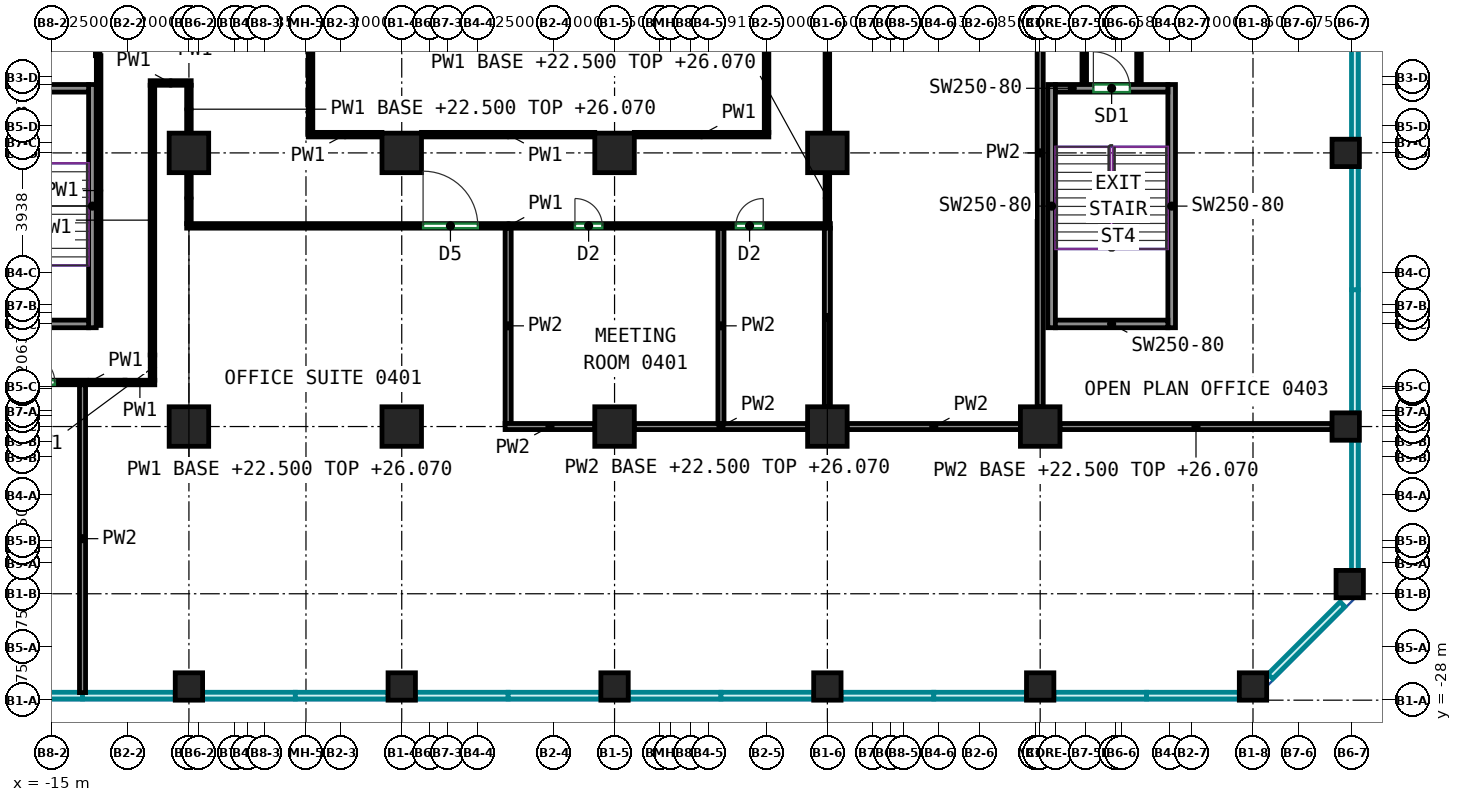
"""IFC4 building model, lengths in metres.
Left out: names, types, materials, properties, quantities, classifications, styles, units other than length and angle.
Written with IfcOpenShell. Run it as: python <this file> out.ifc"""

import sys

from ifc_helpers import new_model, si_unit, direction, frame, frame_2d, origin, origin_2d, place, context, subcontext, project, spatial, rectangle, extrude, source, transform, mapped, element, fill, save


model = new_model("IFC4")
c1 = context("Model", 3, precision=1e-05, world=origin(), true_north=direction((0.0, 1.0)))
c2 = subcontext(c1, "Body", "Model", "MODEL_VIEW")
j1 = project(units=[si_unit("LENGTHUNIT", "METRE"), si_unit("PLANEANGLEUNIT", "RADIAN")], contexts=[c1])
p1 = place(None, origin())
s1 = spatial("IfcSite", under=j1, at=p1, CompositionType="ELEMENT")
p2 = place(p1, origin())
s2 = spatial("IfcBuilding", under=s1, at=p2, CompositionType="ELEMENT")
p3 = place(p2, frame((0.0, 0.0, 22.5)))
s3 = spatial("IfcBuildingStorey", under=s2, at=p3, CompositionType="ELEMENT", Elevation=22.5)
m1 = source(origin(), c2, "Body", "SweptSolid", [
    extrude(rectangle(XDim=0.9, YDim=0.9, at=origin_2d()), origin(), (0.0, 0.0, 1.0), 4.22),
])
p4 = place(p3, frame((-10.5, -27.55, 0.0), z_axis=(0.0, 0.0, 1.0), x_axis=(1.0, 0.0, 0.0)))
e1 = element("IfcColumn", 1, at=p4, inside=s3, PredefinedType="COLUMN", context=c2, shape_type="MappedRepresentation", body=[
    mapped(m1, transform((0.0, 0.0, 0.0))),
])
m2 = source(origin(), c2, "Body", "SweptSolid", [
    extrude(rectangle(XDim=1.3, YDim=1.3, at=origin_2d()), origin(), (0.0, 0.0, 1.0), 4.22),
])
for number, where, z_axis, x_axis in (
    (2, (-10.5, -19.0, 0.0), (0.0, 0.0, 1.0), (1.0, 0.0, 0.0)),
    (3, (-10.5, -10.0, 0.0), (0.0, 0.0, 1.0), (1.0, 0.0, 0.0)),
):
    element("IfcColumn", number, at=place(p3, frame(where, z_axis=z_axis, x_axis=x_axis)), inside=s3, PredefinedType="COLUMN", context=c2, shape_type="MappedRepresentation", body=[
        mapped(m2, transform((0.0, 0.0, 0.0))),
    ])
p5 = place(p3, frame((-3.5, -27.55, 0.0), z_axis=(0.0, 0.0, 1.0), x_axis=(1.0, 0.0, 0.0)))
e4 = element("IfcColumn", 4, at=p5, inside=s3, PredefinedType="COLUMN", context=c2, shape_type="MappedRepresentation", body=[
    mapped(m1, transform((0.0, 0.0, 0.0))),
])
for number, where, z_axis, x_axis in (
    (5, (-3.5, -19.0, 0.0), (0.0, 0.0, 1.0), (1.0, 0.0, 0.0)),
    (6, (-3.5, -10.0, 0.0), (0.0, 0.0, 1.0), (1.0, 0.0, 0.0)),
):
    element("IfcColumn", number, at=place(p3, frame(where, z_axis=z_axis, x_axis=x_axis)), inside=s3, PredefinedType="COLUMN", context=c2, shape_type="MappedRepresentation", body=[
        mapped(m2, transform((0.0, 0.0, 0.0))),
    ])
p6 = place(p3, frame((3.5, -27.55, 0.0), z_axis=(0.0, 0.0, 1.0), x_axis=(1.0, 0.0, 0.0)))
e7 = element("IfcColumn", 7, at=p6, inside=s3, PredefinedType="COLUMN", context=c2, shape_type="MappedRepresentation", body=[
    mapped(m1, transform((0.0, 0.0, 0.0))),
])
for number, where, z_axis, x_axis in (
    (8, (3.5, -19.0, 0.0), (0.0, 0.0, 1.0), (1.0, 0.0, 0.0)),
    (9, (3.5, -10.0, 0.0), (0.0, 0.0, 1.0), (1.0, 0.0, 0.0)),
):
    element("IfcColumn", number, at=place(p3, frame(where, z_axis=z_axis, x_axis=x_axis)), inside=s3, PredefinedType="COLUMN", context=c2, shape_type="MappedRepresentation", body=[
        mapped(m2, transform((0.0, 0.0, 0.0))),
    ])
p7 = place(p3, frame((10.5, -27.55, 0.0), z_axis=(0.0, 0.0, 1.0), x_axis=(1.0, 0.0, 0.0)))
e10 = element("IfcColumn", 10, at=p7, inside=s3, PredefinedType="COLUMN", context=c2, shape_type="MappedRepresentation", body=[
    mapped(m1, transform((0.0, 0.0, 0.0))),
])
for number, where, z_axis, x_axis in (
    (11, (10.5, -19.0, 0.0), (0.0, 0.0, 1.0), (1.0, 0.0, 0.0)),
    (12, (10.5, -10.0, 0.0), (0.0, 0.0, 1.0), (1.0, 0.0, 0.0)),
):
    element("IfcColumn", number, at=place(p3, frame(where, z_axis=z_axis, x_axis=x_axis)), inside=s3, PredefinedType="COLUMN", context=c2, shape_type="MappedRepresentation", body=[
        mapped(m2, transform((0.0, 0.0, 0.0))),
    ])
p8 = place(p3, frame((17.5, -27.55, 0.0), z_axis=(0.0, 0.0, 1.0), x_axis=(1.0, 0.0, 0.0)))
e13 = element("IfcColumn", 13, at=p8, inside=s3, PredefinedType="COLUMN", context=c2, shape_type="MappedRepresentation", body=[
    mapped(m1, transform((0.0, 0.0, 0.0))),
])
p9 = place(p3, frame((17.5, -19.0, 0.0), z_axis=(0.0, 0.0, 1.0), x_axis=(1.0, 0.0, 0.0)))
e14 = element("IfcColumn", 14, at=p9, inside=s3, PredefinedType="COLUMN", context=c2, shape_type="MappedRepresentation", body=[
    mapped(m2, transform((0.0, 0.0, 0.0))),
])
for number, where, z_axis, x_axis in (
    (15, (24.5, -27.55, 0.0), (0.0, 0.0, 1.0), (1.0, 0.0, 0.0)),
    (16, (27.55, -19.0, 0.0), (0.0, 0.0, 1.0), (1.0, 0.0, 0.0)),
    (17, (27.55, -10.0, 0.0), (0.0, 0.0, 1.0), (1.0, 0.0, 0.0)),
    (18, (27.682, -24.182, 0.0), (0.0, 0.0, 1.0), (1.0, 0.0, 0.0)),
):
    element("IfcColumn", number, at=place(p3, frame(where, z_axis=z_axis, x_axis=x_axis)), inside=s3, PredefinedType="COLUMN", context=c2, shape_type="MappedRepresentation", body=[
        mapped(m1, transform((0.0, 0.0, 0.0))),
    ])
m3 = source(origin(), c2, "Body", "SweptSolid", [
    extrude(rectangle(XDim=8.0, YDim=0.25, at=frame_2d((4.0, 0.0))), origin(), (0.0, 0.0, 1.0), 4.22),
])
p10 = place(p3, frame((-13.675, -15.75, 0.0), z_axis=(0.0, 0.0, 1.0), x_axis=(0.0, 1.0, 0.0)))
e19 = element("IfcWall", 19, at=p10, inside=s3, PredefinedType="SHEAR", context=c2, shape_type="MappedRepresentation", body=[
    mapped(m3, transform((0.0, 0.0, 0.0))),
])
m4 = source(origin(), c2, "Body", "SweptSolid", [
    extrude(rectangle(XDim=3.7, YDim=0.25, at=frame_2d((1.85, 0.0))), origin(), (0.0, 0.0, 1.0), 4.22),
])
p11 = place(p3, frame((-17.5, -15.625, 0.0), z_axis=(0.0, 0.0, 1.0), x_axis=(1.0, 0.0, 0.0)))
e20 = element("IfcWall", 20, at=p11, inside=s3, PredefinedType="SHEAR", context=c2, shape_type="MappedRepresentation", body=[
    mapped(m4, transform((0.0, 0.0, 0.0))),
])
p12 = place(p11, frame((1.25, 0.0, 0.0)))
e21 = element("IfcOpeningElement", 21, at=p12, cuts=e20, PredefinedType="OPENING", context=c2, shape_type="SweptSolid", body=[
    extrude(rectangle(XDim=1.2, YDim=2.1, at=frame_2d((0.6, 1.05))), frame((0.0, 0.135, 0.0), z_axis=(0.0, -1.0, 0.0), x_axis=(1.0, 0.0, 0.0)), (0.0, 0.0, 1.0), 0.27),
])
p13 = place(p3, frame((-17.5, -7.875, 0.0), z_axis=(0.0, 0.0, 1.0), x_axis=(1.0, 0.0, 0.0)))
e22 = element("IfcWall", 22, at=p13, inside=s3, PredefinedType="SHEAR", context=c2, shape_type="MappedRepresentation", body=[
    mapped(m4, transform((0.0, 0.0, 0.0))),
])
for number, where, z_axis, x_axis in (
    (23, (17.875, -15.75, 0.0), (0.0, 0.0, 1.0), (0.0, 1.0, 0.0)),
    (24, (21.825, -15.75, 0.0), (0.0, 0.0, 1.0), (0.0, 1.0, 0.0)),
):
    element("IfcWall", number, at=place(p3, frame(where, z_axis=z_axis, x_axis=x_axis)), inside=s3, PredefinedType="SHEAR", context=c2, shape_type="MappedRepresentation", body=[
        mapped(m3, transform((0.0, 0.0, 0.0))),
    ])
p14 = place(p3, frame((18.0, -15.625, 0.0), z_axis=(0.0, 0.0, 1.0), x_axis=(1.0, 0.0, 0.0)))
e25 = element("IfcWall", 25, at=p14, inside=s3, PredefinedType="SHEAR", context=c2, shape_type="MappedRepresentation", body=[
    mapped(m4, transform((0.0, 0.0, 0.0))),
])
p15 = place(p3, frame((18.0, -7.875, 0.0), z_axis=(0.0, 0.0, 1.0), x_axis=(1.0, 0.0, 0.0)))
e26 = element("IfcWall", 26, at=p15, inside=s3, PredefinedType="SHEAR", context=c2, shape_type="MappedRepresentation", body=[
    mapped(m4, transform((0.0, 0.0, 0.0))),
])
p16 = place(p15, frame((1.25, 0.0, 0.0)))
e27 = element("IfcOpeningElement", 27, at=p16, cuts=e26, PredefinedType="OPENING", context=c2, shape_type="SweptSolid", body=[
    extrude(rectangle(XDim=1.2, YDim=2.1, at=frame_2d((0.6, 1.05))), frame((0.0, 0.135, 0.0), z_axis=(0.0, -1.0, 0.0), x_axis=(1.0, 0.0, 0.0)), (0.0, 0.0, 1.0), 0.27),
])
p17 = place(p3, frame((-13.47, -6.802, 0.0), z_axis=(0.0, 0.0, 1.0), x_axis=(0.0, -1.0, 0.0)))
e28 = element("IfcWall", 28, at=p17, inside=s3, PredefinedType="PARTITIONING", context=c2, shape_type="SweptSolid", body=[
    extrude(rectangle(XDim=8.873, YDim=0.15, at=frame_2d((4.437, 0.0))), origin(), (0.0, 0.0, 1.0), 4.22),
])
p18 = place(p3, frame((-13.502, -5.973, 0.0), z_axis=(0.0, 0.0, 1.0), x_axis=(0.0, -1.0, 0.0)))
e29 = element("IfcWall", 29, at=p18, inside=s3, PredefinedType="PARTITIONING", context=c2, shape_type="SweptSolid", body=[
    extrude(rectangle(XDim=0.829, YDim=0.15, at=frame_2d((0.415, 0.0))), origin(), (0.0, 0.0, 1.0), 4.22),
])
p19 = place(p3, frame((-10.575, -12.4, 0.0), z_axis=(0.0, 0.0, 1.0), x_axis=(1.0, 0.0, 0.0)))
e30 = element("IfcWall", 30, at=p19, inside=s3, PredefinedType="PARTITIONING", context=c2, shape_type="SweptSolid", body=[
    extrude(rectangle(XDim=21.175, YDim=0.15, at=frame_2d((10.587, 0.0))), origin(), (0.0, 0.0, 1.0), 4.22),
])
p20 = place(p19, frame((7.777, 0.0, 0.0)))
e31 = element("IfcOpeningElement", 31, at=p20, cuts=e30, PredefinedType="OPENING", context=c2, shape_type="SweptSolid", body=[
    extrude(rectangle(XDim=1.8, YDim=2.1, at=frame_2d((0.9, 1.05))), frame((0.0, 0.085, 0.0), z_axis=(0.0, -1.0, 0.0), x_axis=(1.0, 0.0, 0.0)), (0.0, 0.0, 1.0), 0.17),
])
p21 = place(p19, frame((12.772, 0.0, 0.0)))
e32 = element("IfcOpeningElement", 32, at=p21, cuts=e30, PredefinedType="OPENING", context=c2, shape_type="SweptSolid", body=[
    extrude(rectangle(XDim=0.9, YDim=2.1, at=frame_2d((0.45, 1.05))), frame((0.0, 0.085, 0.0), z_axis=(0.0, -1.0, 0.0), x_axis=(1.0, 0.0, 0.0)), (0.0, 0.0, 1.0), 0.17),
])
p22 = place(p19, frame((18.066, 0.0, 0.0)))
e33 = element("IfcOpeningElement", 33, at=p22, cuts=e30, PredefinedType="OPENING", context=c2, shape_type="SweptSolid", body=[
    extrude(rectangle(XDim=0.9, YDim=2.1, at=frame_2d((0.45, 1.05))), frame((0.0, 0.085, 0.0), z_axis=(0.0, -1.0, 0.0), x_axis=(1.0, 0.0, 0.0)), (0.0, 0.0, 1.0), 0.17),
])
p23 = place(p3, frame((-10.5, -12.325, 0.0), z_axis=(0.0, 0.0, 1.0), x_axis=(0.0, 1.0, 0.0)))
e34 = element("IfcWall", 34, at=p23, inside=s3, PredefinedType="PARTITIONING", context=c2, shape_type="SweptSolid", body=[
    extrude(rectangle(XDim=1.675, YDim=0.15, at=frame_2d((0.837, 0.0))), origin(), (0.0, 0.0, 1.0), 3.57),
])
p24 = place(p3, frame((-10.5, -9.35, 0.0), z_axis=(0.0, 0.0, 1.0), x_axis=(0.0, 1.0, 0.0)))
e35 = element("IfcWall", 35, at=p24, inside=s3, PredefinedType="PARTITIONING", context=c2, shape_type="SweptSolid", body=[
    extrude(rectangle(XDim=1.575, YDim=0.15, at=frame_2d((0.788, 0.0))), origin(), (0.0, 0.0, 1.0), 3.57),
])
p25 = place(p3, frame((-11.775, -7.7, 0.0), z_axis=(0.0, 0.0, 1.0), x_axis=(1.0, 0.0, 0.0)))
e36 = element("IfcWall", 36, at=p25, inside=s3, PredefinedType="PARTITIONING", context=c2, shape_type="SweptSolid", body=[
    extrude(rectangle(XDim=1.35, YDim=0.15, at=frame_2d((0.675, 0.0))), origin(), (0.0, 0.0, 1.0), 4.22),
])
p26 = place(p3, frame((-11.7, -16.648, 0.0), z_axis=(0.0, 0.0, 1.0), x_axis=(0.0, 1.0, 0.0)))
e37 = element("IfcWall", 37, at=p26, inside=s3, PredefinedType="PARTITIONING", context=c2, shape_type="SweptSolid", body=[
    extrude(rectangle(XDim=8.873, YDim=0.15, at=frame_2d((4.437, 0.0))), origin(), (0.0, 0.0, 1.0), 4.22),
])
p27 = place(p3, frame((-11.698, -17.477, 0.0), z_axis=(0.0, 0.0, 1.0), x_axis=(0.0, 1.0, 0.0)))
e38 = element("IfcWall", 38, at=p27, inside=s3, PredefinedType="PARTITIONING", context=c2, shape_type="SweptSolid", body=[
    extrude(rectangle(XDim=0.829, YDim=0.15, at=frame_2d((0.415, 0.0))), origin(), (0.0, 0.0, 1.0), 4.22),
])
p28 = place(p3, frame((-12.602, -17.552, 0.0), z_axis=(0.0, 0.0, 1.0), x_axis=(1.0, 0.0, 0.0)))
e39 = element("IfcWall", 39, at=p28, inside=s3, PredefinedType="PARTITIONING", context=c2, shape_type="SweptSolid", body=[
    extrude(rectangle(XDim=0.979, YDim=0.15, at=frame_2d((0.49, 0.0))), origin(), (0.0, 0.0, 1.0), 4.22),
])
p29 = place(p3, frame((-16.625, -17.55, 0.0), z_axis=(0.0, 0.0, 1.0), x_axis=(1.0, 0.0, 0.0)))
e40 = element("IfcWall", 40, at=p29, inside=s3, PredefinedType="PARTITIONING", context=c2, shape_type="SweptSolid", body=[
    extrude(rectangle(XDim=4.023, YDim=0.15, at=frame_2d((2.011, 0.0))), origin(), (0.0, 0.0, 1.0), 4.22),
])
p30 = place(p29, frame((0.816, 0.0, 0.0)))
e41 = element("IfcOpeningElement", 41, at=p30, cuts=e40, PredefinedType="OPENING", context=c2, shape_type="SweptSolid", body=[
    extrude(rectangle(XDim=0.9, YDim=2.1, at=frame_2d((0.45, 1.05))), frame((0.0, 0.085, 0.0), z_axis=(0.0, -1.0, 0.0), x_axis=(1.0, 0.0, 0.0)), (0.0, 0.0, 1.0), 0.17),
])
p31 = place(p3, frame((10.5, -9.35, 0.0), z_axis=(0.0, 0.0, 1.0), x_axis=(0.0, 1.0, 0.0)))
e42 = element("IfcWall", 42, at=p31, inside=s3, PredefinedType="PARTITIONING", context=c2, shape_type="SweptSolid", body=[
    extrude(rectangle(XDim=7.7, YDim=0.15, at=frame_2d((3.85, 0.0))), origin(), (0.0, 0.0, 1.0), 3.57),
])
p32 = place(p31, frame((2.74, 0.0, 0.0)))
e43 = element("IfcOpeningElement", 43, at=p32, cuts=e42, PredefinedType="OPENING", context=c2, shape_type="SweptSolid", body=[
    extrude(rectangle(XDim=0.9, YDim=2.1, at=frame_2d((0.45, 1.05))), frame((0.0, 0.085, 0.0), z_axis=(0.0, -1.0, 0.0), x_axis=(1.0, 0.0, 0.0)), (0.0, 0.0, 1.0), 0.17),
])
p33 = place(p3, frame((10.5, -12.325, 0.0), z_axis=(0.0, 0.0, 1.0), x_axis=(0.0, 1.0, 0.0)))
e44 = element("IfcWall", 44, at=p33, inside=s3, PredefinedType="PARTITIONING", context=c2, shape_type="SweptSolid", body=[
    extrude(rectangle(XDim=1.675, YDim=0.15, at=frame_2d((0.837, 0.0))), origin(), (0.0, 0.0, 1.0), 3.57),
])
p34 = place(p3, frame((20.75, -7.75, 0.0), z_axis=(0.0, 0.0, 1.0), x_axis=(0.0, 1.0, 0.0)))
e45 = element("IfcWall", 45, at=p34, inside=s3, PredefinedType="PARTITIONING", context=c2, shape_type="SweptSolid", body=[
    extrude(rectangle(XDim=6.66, YDim=0.15, at=frame_2d((3.33, 0.0))), origin(), (0.0, 0.0, 1.0), 4.22),
])
p35 = place(p3, frame((18.95, 3.425, 0.0), z_axis=(0.0, 0.0, 1.0), x_axis=(0.0, -1.0, 0.0)))
e46 = element("IfcWall", 46, at=p35, inside=s3, PredefinedType="PARTITIONING", context=c2, shape_type="SweptSolid", body=[
    extrude(rectangle(XDim=11.175, YDim=0.15, at=frame_2d((5.587, 0.0))), origin(), (0.0, 0.0, 1.0), 4.22),
])
p36 = place(p35, frame((0.704, 0.0, 0.0)))
e47 = element("IfcOpeningElement", 47, at=p36, cuts=e46, PredefinedType="OPENING", context=c2, shape_type="SweptSolid", body=[
    extrude(rectangle(XDim=0.9, YDim=2.1, at=frame_2d((0.45, 1.05))), frame((0.0, 0.085, 0.0), z_axis=(0.0, -1.0, 0.0), x_axis=(1.0, 0.0, 0.0)), (0.0, 0.0, 1.0), 0.17),
])
p37 = place(p3, frame((-6.5, -9.325, 0.0), z_axis=(0.0, 0.0, 1.0), x_axis=(0.0, 1.0, 0.0)))
e48 = element("IfcWall", 48, at=p37, inside=s3, PredefinedType="PARTITIONING", context=c2, shape_type="SweptSolid", body=[
    extrude(rectangle(XDim=14.675, YDim=0.15, at=frame_2d((7.337, 0.0))), origin(), (0.0, 0.0, 1.0), 4.22),
])
p38 = place(p3, frame((-6.575, -9.4, 0.0), z_axis=(0.0, 0.0, 1.0), x_axis=(1.0, 0.0, 0.0)))
e49 = element("IfcWall", 49, at=p38, inside=s3, PredefinedType="PARTITIONING", context=c2, shape_type="SweptSolid", body=[
    extrude(rectangle(XDim=2.425, YDim=0.15, at=frame_2d((1.212, 0.0))), origin(), (0.0, 0.0, 1.0), 4.22),
])
p39 = place(p3, frame((-2.85, -9.4, 0.0), z_axis=(0.0, 0.0, 1.0), x_axis=(1.0, 0.0, 0.0)))
e50 = element("IfcWall", 50, at=p39, inside=s3, PredefinedType="PARTITIONING", context=c2, shape_type="SweptSolid", body=[
    extrude(rectangle(XDim=5.7, YDim=0.15, at=frame_2d((2.85, 0.0))), origin(), (0.0, 0.0, 1.0), 4.22),
])
p40 = place(p3, frame((4.15, -9.4, 0.0), z_axis=(0.0, 0.0, 1.0), x_axis=(1.0, 0.0, 0.0)))
e51 = element("IfcWall", 51, at=p40, inside=s3, PredefinedType="PARTITIONING", context=c2, shape_type="SweptSolid", body=[
    extrude(rectangle(XDim=4.425, YDim=0.15, at=frame_2d((2.212, 0.0))), origin(), (0.0, 0.0, 1.0), 4.22),
])
p41 = place(p3, frame((8.5, 5.525, 0.0), z_axis=(0.0, 0.0, 1.0), x_axis=(0.0, -1.0, 0.0)))
e52 = element("IfcWall", 52, at=p41, inside=s3, PredefinedType="PARTITIONING", context=c2, shape_type="SweptSolid", body=[
    extrude(rectangle(XDim=14.85, YDim=0.15, at=frame_2d((7.425, 0.0))), origin(), (0.0, 0.0, 1.0), 4.22),
])
p42 = place(p41, frame((9.735, 0.0, 0.0)))
e53 = element("IfcOpeningElement", 53, at=p42, cuts=e52, PredefinedType="OPENING", context=c2, shape_type="SweptSolid", body=[
    extrude(rectangle(XDim=1.0, YDim=2.1, at=frame_2d((0.5, 1.05))), frame((0.0, 0.085, 0.0), z_axis=(0.0, -1.0, 0.0), x_axis=(1.0, 0.0, 0.0)), (0.0, 0.0, 1.0), 0.17),
])
p43 = place(p3, frame((-14.0, -27.75, 0.0), z_axis=(0.0, 0.0, 1.0), x_axis=(0.0, 1.0, 0.0)))
e54 = element("IfcWall", 54, at=p43, inside=s3, PredefinedType="PARTITIONING", context=c2, shape_type="SweptSolid", body=[
    extrude(rectangle(XDim=10.124, YDim=0.2, at=frame_2d((5.062, 0.0))), origin(), (0.0, 0.0, 1.0), 4.22),
])
p44 = place(p3, frame((0.0, -18.9, 0.0), z_axis=(0.0, 0.0, 1.0), x_axis=(0.0, 1.0, 0.0)))
e55 = element("IfcWall", 55, at=p44, inside=s3, PredefinedType="PARTITIONING", context=c2, shape_type="SweptSolid", body=[
    extrude(rectangle(XDim=6.424, YDim=0.2, at=frame_2d((3.212, 0.0))), origin(), (0.0, 0.0, 1.0), 4.22),
])
p45 = place(p3, frame((-0.1, -19.0, 0.0), z_axis=(0.0, 0.0, 1.0), x_axis=(1.0, 0.0, 0.0)))
e56 = element("IfcWall", 56, at=p45, inside=s3, PredefinedType="PARTITIONING", context=c2, shape_type="SweptSolid", body=[
    extrude(rectangle(XDim=2.95, YDim=0.2, at=frame_2d((1.475, 0.0))), origin(), (0.0, 0.0, 1.0), 4.22),
])
for number, where, z_axis, x_axis in (
    (57, (4.15, -19.0, 0.0), (0.0, 0.0, 1.0), (1.0, 0.0, 0.0)),
    (58, (11.15, -19.0, 0.0), (0.0, 0.0, 1.0), (1.0, 0.0, 0.0)),
):
    element("IfcWall", number, at=place(p3, frame(where, z_axis=z_axis, x_axis=x_axis)), inside=s3, PredefinedType="PARTITIONING", context=c2, shape_type="SweptSolid", body=[
        extrude(rectangle(XDim=5.7, YDim=0.2, at=frame_2d((2.85, 0.0))), origin(), (0.0, 0.0, 1.0), 4.22),
    ])
p46 = place(p3, frame((18.15, -19.0, 0.0), z_axis=(0.0, 0.0, 1.0), x_axis=(1.0, 0.0, 0.0)))
e59 = element("IfcWall", 59, at=p46, inside=s3, PredefinedType="PARTITIONING", context=c2, shape_type="SweptSolid", body=[
    extrude(rectangle(XDim=8.95, YDim=0.2, at=frame_2d((4.475, 0.0))), origin(), (0.0, 0.0, 1.0), 3.57),
])
p47 = place(p3, frame((7.0, -18.9, 0.0), z_axis=(0.0, 0.0, 1.0), x_axis=(0.0, 1.0, 0.0)))
e60 = element("IfcWall", 60, at=p47, inside=s3, PredefinedType="PARTITIONING", context=c2, shape_type="SweptSolid", body=[
    extrude(rectangle(XDim=6.424, YDim=0.2, at=frame_2d((3.212, 0.0))), origin(), (0.0, 0.0, 1.0), 4.22),
])
p48 = place(p3, frame((10.5, -18.35, 0.0), z_axis=(0.0, 0.0, 1.0), x_axis=(0.0, 1.0, 0.0)))
e61 = element("IfcWall", 61, at=p48, inside=s3, PredefinedType="PARTITIONING", context=c2, shape_type="SweptSolid", body=[
    extrude(rectangle(XDim=5.874, YDim=0.2, at=frame_2d((2.937, 0.0))), origin(), (0.0, 0.0, 1.0), 3.57),
])
p49 = place(p3, frame((17.5, -18.35, 0.0), z_axis=(0.0, 0.0, 1.0), x_axis=(0.0, 1.0, 0.0)))
e62 = element("IfcWall", 62, at=p49, inside=s3, PredefinedType="PARTITIONING", context=c2, shape_type="SweptSolid", body=[
    extrude(rectangle(XDim=16.7, YDim=0.2, at=frame_2d((8.35, 0.0))), origin(), (0.0, 0.0, 1.0), 4.22),
])
p50 = place(p16, origin())
e63 = element("IfcDoor", 63, at=p50, inside=s3, OperationType="DOUBLE_DOOR_SINGLE_SWING", PredefinedType="DOOR", context=c2, shape_type="SweptSolid", body=[
    extrude(rectangle(XDim=1.2, YDim=2.1, at=frame_2d((0.6, 1.05))), frame((0.0, 0.025, 0.0), z_axis=(0.0, -1.0, 0.0), x_axis=(1.0, 0.0, 0.0)), (0.0, 0.0, 1.0), 0.05),
])
fill(e27, e63)
p51 = place(p30, origin())
e64 = element("IfcDoor", 64, at=p51, inside=s3, OperationType="SINGLE_SWING_LEFT", PredefinedType="DOOR", context=c2, shape_type="SweptSolid", body=[
    extrude(rectangle(XDim=0.9, YDim=2.1, at=frame_2d((0.45, 1.05))), frame((0.0, 0.025, 0.0), z_axis=(0.0, -1.0, 0.0), x_axis=(1.0, 0.0, 0.0)), (0.0, 0.0, 1.0), 0.05),
])
fill(e41, e64)
p52 = place(p20, origin())
e65 = element("IfcDoor", 65, at=p52, inside=s3, OperationType="DOUBLE_DOOR_SINGLE_SWING", PredefinedType="DOOR", context=c2, shape_type="SweptSolid", body=[
    extrude(rectangle(XDim=1.8, YDim=2.1, at=frame_2d((0.9, 1.05))), frame((0.0, 0.025, 0.0), z_axis=(0.0, -1.0, 0.0), x_axis=(1.0, 0.0, 0.0)), (0.0, 0.0, 1.0), 0.05),
])
fill(e31, e65)
p53 = place(p21, origin())
e66 = element("IfcDoor", 66, at=p53, inside=s3, OperationType="SINGLE_SWING_LEFT", PredefinedType="DOOR", context=c2, shape_type="SweptSolid", body=[
    extrude(rectangle(XDim=0.9, YDim=2.1, at=frame_2d((0.45, 1.05))), frame((0.0, 0.025, 0.0), z_axis=(0.0, -1.0, 0.0), x_axis=(1.0, 0.0, 0.0)), (0.0, 0.0, 1.0), 0.05),
])
fill(e32, e66)
p54 = place(p22, origin())
e67 = element("IfcDoor", 67, at=p54, inside=s3, OperationType="SINGLE_SWING_RIGHT", PredefinedType="DOOR", context=c2, shape_type="SweptSolid", body=[
    extrude(rectangle(XDim=0.9, YDim=2.1, at=frame_2d((0.45, 1.05))), frame((0.0, 0.025, 0.0), z_axis=(0.0, -1.0, 0.0), x_axis=(1.0, 0.0, 0.0)), (0.0, 0.0, 1.0), 0.05),
])
fill(e33, e67)
save(model, sys.argv[1])
